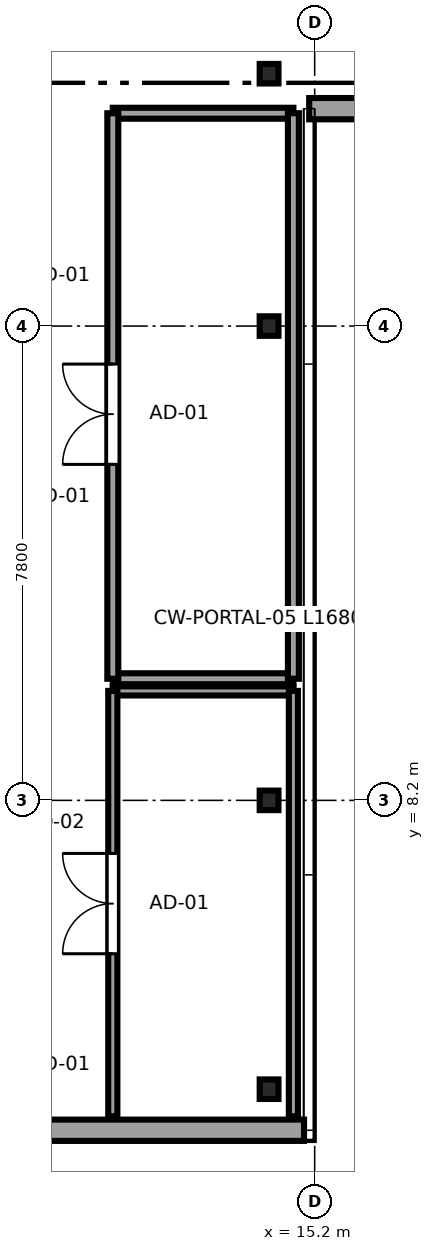
"""IFC4 building model, lengths in metres.
Left out: names, types, materials, properties, quantities, classifications, styles, units other than length and angle.
Written with IfcOpenShell. Run it as: python <this file> out.ifc"""

import sys

from ifc_helpers import new_model, si_unit, direction, frame, frame_2d, origin, origin_2d, place, context, subcontext, project, spatial, rectangle, i_section, extrude, source, transform, mapped, element, fill, save


model = new_model("IFC4")
c1 = context("Model", 3, precision=1e-05, world=origin(), true_north=direction((0.0, 1.0)))
c2 = subcontext(c1, "Body", "Model", "MODEL_VIEW")
j1 = project(units=[si_unit("LENGTHUNIT", "METRE"), si_unit("PLANEANGLEUNIT", "RADIAN")], contexts=[c1])
p1 = place(None, origin())
s1 = spatial("IfcSite", under=j1, at=p1, CompositionType="ELEMENT")
p2 = place(p1, origin())
s2 = spatial("IfcBuilding", under=s1, at=p2, CompositionType="ELEMENT")
p3 = place(p2, frame((0.0, 0.0, 266.5)))
s3 = spatial("IfcBuildingStorey", under=s2, at=p3, CompositionType="ELEMENT", Elevation=266.5)
m1 = source(origin(), c2, "Body", "SweptSolid", [
    extrude(i_section(OverallWidth=0.309, OverallDepth=0.321, WebThickness=0.014, FlangeThickness=0.022, FilletRadius=0.017, at=origin_2d()), origin(), (0.0, 0.0, 1.0), 3.55),
])
for number, where, z_axis, x_axis in (
    (1, (14.45, 3.45, 0.0), (0.0, 0.0, 1.0), (1.0, 0.0, 0.0)),
    (2, (14.45, 8.2, 0.0), (0.0, 0.0, 1.0), (1.0, 0.0, 0.0)),
    (3, (14.45, 16.0, 0.0), (0.0, 0.0, 1.0), (1.0, 0.0, 0.0)),
    (4, (14.45, 20.15, 0.0), (0.0, 0.0, 1.0), (1.0, 0.0, 0.0)),
):
    element("IfcColumn", number, at=place(p3, frame(where, z_axis=z_axis, x_axis=x_axis)), inside=s3, PredefinedType="COLUMN", context=c2, shape_type="MappedRepresentation", body=[
        mapped(m1, transform((0.0, 0.0, 0.0), x_axis=(1.0, 0.0, 0.0), y_axis=(0.0, 1.0, 0.0), z_axis=(0.0, 0.0, 1.0), scale=1.0)),
    ])
p4 = place(p3, frame((7.017, 2.775, 0.0), z_axis=(0.0, 0.0, 1.0), x_axis=(1.0, 0.0, 0.0)))
e5 = element("IfcWall", 5, at=p4, inside=s3, PredefinedType="SOLIDWALL", context=c2, shape_type="SweptSolid", body=[
    extrude(rectangle(XDim=8.008, YDim=0.35, at=frame_2d((4.004, 0.0))), origin(), (0.0, 0.0, 1.0), 3.25),
])
p5 = place(p4, frame((0.791, 0.0, 0.62)))
e6 = element("IfcOpeningElement", 6, at=p5, cuts=e5, PredefinedType="OPENING", context=c2, shape_type="SweptSolid", body=[
    extrude(rectangle(XDim=1.5, YDim=1.55, at=frame_2d((0.75, 0.775))), frame((0.0, 0.185, 0.0), z_axis=(0.0, -1.0, 0.0), x_axis=(1.0, 0.0, 0.0)), (0.0, 0.0, 1.0), 0.37),
])
p6 = place(p3, frame((15.11, 19.575, 0.0), z_axis=(0.0, 0.0, 1.0), x_axis=(1.0, 0.0, 0.0)))
e7 = element("IfcWall", 7, at=p6, inside=s3, PredefinedType="SOLIDWALL", context=c2, shape_type="SweptSolid", body=[
    extrude(rectangle(XDim=16.98, YDim=0.35, at=frame_2d((8.49, 0.0))), origin(), (0.0, 0.0, 1.0), 3.25),
])
for number, where, z_axis, x_axis in (
    (8, (11.88, 10.2, 0.0), (0.0, 0.0, 1.0), (1.0, 0.0, 0.0)),
    (9, (11.88, 19.5, 0.0), (0.0, 0.0, 1.0), (1.0, 0.0, 0.0)),
):
    element("IfcWall", number, at=place(p3, frame(where, z_axis=z_axis, x_axis=x_axis)), inside=s3, PredefinedType="PARTITIONING", context=c2, shape_type="SweptSolid", body=[
        extrude(rectangle(XDim=2.97, YDim=0.18, at=frame_2d((1.485, 0.0))), origin(), (0.0, 0.0, 1.0), 3.25),
    ])
p7 = place(p3, frame((11.88, 10.2, 0.0), z_axis=(0.0, 0.0, 1.0), x_axis=(0.0, 1.0, 0.0)))
e10 = element("IfcWall", 10, at=p7, inside=s3, PredefinedType="PARTITIONING", context=c2, shape_type="SweptSolid", body=[
    extrude(rectangle(XDim=9.3, YDim=0.18, at=frame_2d((4.65, 0.0))), origin(), (0.0, 0.0, 1.0), 3.25),
])
p8 = place(p7, frame((3.525, 0.0, 0.0)))
e11 = element("IfcOpeningElement", 11, at=p8, cuts=e10, PredefinedType="OPENING", context=c2, shape_type="SweptSolid", body=[
    extrude(rectangle(XDim=1.65, YDim=2.15, at=frame_2d((0.825, 1.075))), frame((0.0, 0.1, 0.0), z_axis=(0.0, -1.0, 0.0), x_axis=(1.0, 0.0, 0.0)), (0.0, 0.0, 1.0), 0.2),
])
p9 = place(p3, frame((14.85, 10.2, 0.0), z_axis=(0.0, 0.0, 1.0), x_axis=(0.0, 1.0, 0.0)))
e12 = element("IfcWall", 12, at=p9, inside=s3, PredefinedType="PARTITIONING", context=c2, shape_type="SweptSolid", body=[
    extrude(rectangle(XDim=9.3, YDim=0.18, at=frame_2d((4.65, 0.0))), origin(), (0.0, 0.0, 1.0), 3.25),
])
p10 = place(p3, frame((11.88, 10.0, 0.0), z_axis=(0.0, 0.0, 1.0), x_axis=(1.0, 0.0, 0.0)))
e13 = element("IfcWall", 13, at=p10, inside=s3, PredefinedType="PARTITIONING", context=c2, shape_type="SweptSolid", body=[
    extrude(rectangle(XDim=2.97, YDim=0.15, at=frame_2d((1.485, 0.0))), origin(), (0.0, 0.0, 1.0), 3.25),
])
p11 = place(p3, frame((11.88, 3.005, 0.0), z_axis=(0.0, 0.0, 1.0), x_axis=(0.0, 1.0, 0.0)))
e14 = element("IfcWall", 14, at=p11, inside=s3, PredefinedType="PARTITIONING", context=c2, shape_type="SweptSolid", body=[
    extrude(rectangle(XDim=6.995, YDim=0.15, at=frame_2d((3.498, 0.0))), origin(), (0.0, 0.0, 1.0), 3.25),
])
p12 = place(p11, frame((2.673, 0.0, 0.0)))
e15 = element("IfcOpeningElement", 15, at=p12, cuts=e14, PredefinedType="OPENING", context=c2, shape_type="SweptSolid", body=[
    extrude(rectangle(XDim=1.65, YDim=2.15, at=frame_2d((0.825, 1.075))), frame((0.0, 0.085, 0.0), z_axis=(0.0, -1.0, 0.0), x_axis=(1.0, 0.0, 0.0)), (0.0, 0.0, 1.0), 0.17),
])
p13 = place(p3, frame((14.85, 3.005, 0.0), z_axis=(0.0, 0.0, 1.0), x_axis=(0.0, 1.0, 0.0)))
e16 = element("IfcWall", 16, at=p13, inside=s3, PredefinedType="PARTITIONING", context=c2, shape_type="SweptSolid", body=[
    extrude(rectangle(XDim=6.995, YDim=0.15, at=frame_2d((3.498, 0.0))), origin(), (0.0, 0.0, 1.0), 3.25),
])
m2 = source(origin(), c2, "Body", "SweptSolid", [
    extrude(rectangle(XDim=1.65, YDim=2.15, at=frame_2d((0.825, 1.075))), frame((0.0, 0.025, 0.0), z_axis=(0.0, -1.0, 0.0), x_axis=(1.0, 0.0, 0.0)), (0.0, 0.0, 1.0), 0.05),
])
p14 = place(p8, origin())
e17 = element("IfcDoor", 17, at=p14, inside=s3, OperationType="DOUBLE_DOOR_SINGLE_SWING", PredefinedType="DOOR", context=c2, shape_type="MappedRepresentation", body=[
    mapped(m2, transform((0.0, 0.0, 0.0), x_axis=(1.0, 0.0, 0.0), y_axis=(0.0, 1.0, 0.0), z_axis=(0.0, 0.0, 1.0), scale=1.0)),
])
fill(e11, e17)
p15 = place(p12, origin())
e18 = element("IfcDoor", 18, at=p15, inside=s3, OperationType="DOUBLE_DOOR_SINGLE_SWING", PredefinedType="DOOR", context=c2, shape_type="MappedRepresentation", body=[
    mapped(m2, transform((0.0, 0.0, 0.0), x_axis=(1.0, 0.0, 0.0), y_axis=(0.0, 1.0, 0.0), z_axis=(0.0, 0.0, 1.0), scale=1.0)),
])
fill(e15, e18)
save(model, sys.argv[1])
